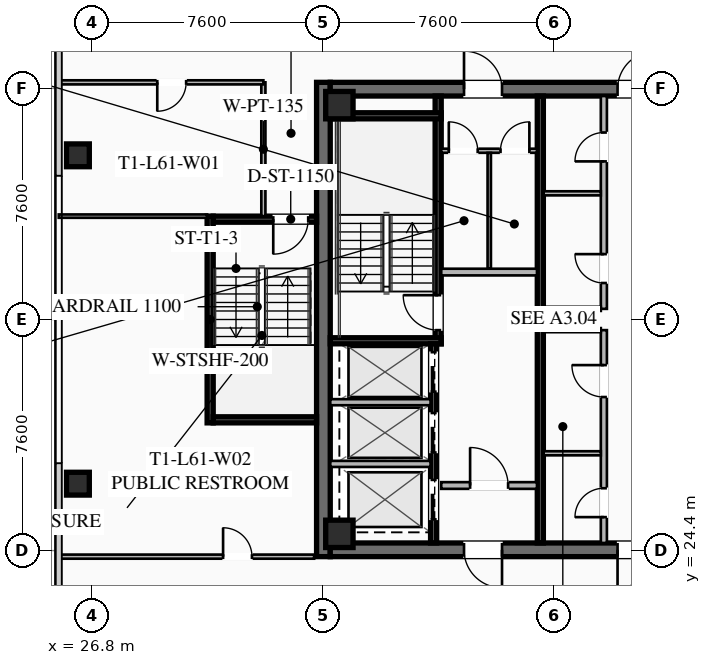
"""IFC4 building model, lengths in metres.
Left out: names, types, materials, properties, quantities, classifications, styles, units other than length and angle.
Written with IfcOpenShell. Run it as: python <this file> out.ifc"""

import sys

from ifc_helpers import new_model, si_unit, direction, frame, frame_2d, origin, origin_2d, place, context, subcontext, project, spatial, rectangle, hollow_rectangle, extrude, element, fill, save


model = new_model("IFC4")
c1 = context("Model", 3, precision=1e-05, world=origin(), true_north=direction((0.0, 1.0)))
c2 = subcontext(c1, "Body", "Model", "MODEL_VIEW")
j1 = project(units=[si_unit("LENGTHUNIT", "METRE"), si_unit("PLANEANGLEUNIT", "RADIAN")], contexts=[c1])
p1 = place(None, origin())
s1 = spatial("IfcSite", under=j1, at=p1, CompositionType="ELEMENT")
p2 = place(p1, origin())
s2 = spatial("IfcBuilding", under=s1, at=p2, CompositionType="ELEMENT")
p3 = place(p2, frame((0.0, 0.0, 225.5)))
s3 = spatial("IfcBuildingStorey", under=s2, at=p3, CompositionType="ELEMENT", Elevation=225.5)
p4 = place(p3, frame((34.425, 24.2, 0.0), z_axis=(0.0, 0.0, 1.0), x_axis=(0.0, 1.0, 0.0)))
e1 = element("IfcWall", 1, at=p4, inside=s3, PredefinedType="SHEAR", context=c2, shape_type="SweptSolid", body=[
    extrude(rectangle(XDim=15.6, YDim=0.45, at=frame_2d((7.8, 0.0))), origin(), (0.0, 0.0, 1.0), 3.55),
])
p5 = place(p3, frame((49.35, 24.425, 0.0), z_axis=(0.0, 0.0, 1.0), x_axis=(-1.0, 0.0, 0.0)))
e2 = element("IfcWall", 2, at=p5, inside=s3, PredefinedType="SHEAR", context=c2, shape_type="SweptSolid", body=[
    extrude(rectangle(XDim=14.7, YDim=0.45, at=frame_2d((7.35, 0.0))), origin(), (0.0, 0.0, 1.0), 3.55),
])
p6 = place(p5, frame((9.05, 0.0, 0.0)))
e3 = element("IfcOpeningElement", 3, at=p6, cuts=e2, PredefinedType="OPENING", context=c2, shape_type="SweptSolid", body=[
    extrude(rectangle(XDim=1.25, YDim=2.25, at=frame_2d((0.625, 1.125))), frame((0.0, 0.235, 0.0), z_axis=(0.0, -1.0, 0.0), x_axis=(1.0, 0.0, 0.0)), (0.0, 0.0, 1.0), 0.47),
])
p7 = place(p5, frame((4.0, 0.0, 0.0)))
e4 = element("IfcOpeningElement", 4, at=p7, cuts=e2, PredefinedType="OPENING", context=c2, shape_type="SweptSolid", body=[
    extrude(rectangle(XDim=1.25, YDim=2.25, at=frame_2d((0.625, 1.125))), frame((0.0, 0.235, 0.0), z_axis=(0.0, -1.0, 0.0), x_axis=(1.0, 0.0, 0.0)), (0.0, 0.0, 1.0), 0.47),
])
p8 = place(p3, frame((34.65, 39.575, 0.0), z_axis=(0.0, 0.0, 1.0), x_axis=(1.0, 0.0, 0.0)))
e5 = element("IfcWall", 5, at=p8, inside=s3, PredefinedType="SHEAR", context=c2, shape_type="SweptSolid", body=[
    extrude(rectangle(XDim=14.7, YDim=0.45, at=frame_2d((7.35, 0.0))), origin(), (0.0, 0.0, 1.0), 3.55),
])
p9 = place(p8, frame((4.4, 0.0, 0.0)))
e6 = element("IfcOpeningElement", 6, at=p9, cuts=e5, PredefinedType="OPENING", context=c2, shape_type="SweptSolid", body=[
    extrude(rectangle(XDim=1.25, YDim=2.25, at=frame_2d((0.625, 1.125))), frame((0.0, 0.235, 0.0), z_axis=(0.0, -1.0, 0.0), x_axis=(1.0, 0.0, 0.0)), (0.0, 0.0, 1.0), 0.47),
])
p10 = place(p8, frame((9.45, 0.0, 0.0)))
e7 = element("IfcOpeningElement", 7, at=p10, cuts=e5, PredefinedType="OPENING", context=c2, shape_type="SweptSolid", body=[
    extrude(rectangle(XDim=1.25, YDim=2.25, at=frame_2d((0.625, 1.125))), frame((0.0, 0.235, 0.0), z_axis=(0.0, -1.0, 0.0), x_axis=(1.0, 0.0, 0.0)), (0.0, 0.0, 1.0), 0.47),
])
for number, where, z_axis, x_axis in (
    (8, (34.95, 24.95, 0.0), (0.0, 0.0, 1.0), (1.0, 0.0, 0.0)),
    (9, (34.95, 39.05, 0.0), (0.0, 0.0, 1.0), (1.0, 0.0, 0.0)),
):
    element("IfcColumn", number, at=place(p3, frame(where, z_axis=z_axis, x_axis=x_axis)), inside=s3, PredefinedType="COLUMN", context=c2, shape_type="SweptSolid", body=[
        extrude(hollow_rectangle(XDim=0.9, YDim=0.9, WallThickness=0.04, at=origin_2d()), origin(), (0.0, 0.0, 1.0), 3.37),
    ])
for number, where, z_axis, x_axis in (
    (10, (26.35, 37.4, 0.0), (0.0, 0.0, 1.0), (1.0, 0.0, 0.0)),
    (11, (26.35, 26.6, 0.0), (0.0, 0.0, 1.0), (1.0, 0.0, 0.0)),
):
    element("IfcColumn", number, at=place(p3, frame(where, z_axis=z_axis, x_axis=x_axis)), inside=s3, PredefinedType="COLUMN", context=c2, shape_type="SweptSolid", body=[
        extrude(hollow_rectangle(XDim=0.75, YDim=0.75, WallThickness=0.032, at=origin_2d()), origin(), (0.0, 0.0, 1.0), 3.37),
    ])
p11 = place(p3, frame((38.2, 31.2, 0.0), z_axis=(0.0, 0.0, 1.0), x_axis=(0.0, 1.0, 0.0)))
e12 = element("IfcWall", 12, at=p11, inside=s3, PredefinedType="SHEAR", context=c2, shape_type="SweptSolid", body=[
    extrude(rectangle(XDim=8.15, YDim=0.2, at=frame_2d((4.075, 0.0))), origin(), (0.0, 0.0, 1.0), 3.37),
])
p12 = place(p11, frame((0.45, 0.0, 0.0)))
e13 = element("IfcOpeningElement", 13, at=p12, cuts=e12, PredefinedType="OPENING", context=c2, shape_type="SweptSolid", body=[
    extrude(rectangle(XDim=1.15, YDim=2.2, at=frame_2d((0.575, 1.1))), frame((0.0, 0.11, 0.0), z_axis=(0.0, -1.0, 0.0), x_axis=(1.0, 0.0, 0.0)), (0.0, 0.0, 1.0), 0.22),
])
for number, where, z_axis, x_axis in (
    (14, (34.65, 31.3, 0.0), (0.0, 0.0, 1.0), (1.0, 0.0, 0.0)),
    (15, (34.65, 38.7, 0.0), (0.0, 0.0, 1.0), (1.0, 0.0, 0.0)),
):
    element("IfcWall", number, at=place(p3, frame(where, z_axis=z_axis, x_axis=x_axis)), inside=s3, PredefinedType="SHEAR", context=c2, shape_type="SweptSolid", body=[
        extrude(rectangle(XDim=3.65, YDim=0.2, at=frame_2d((1.825, 0.0))), origin(), (0.0, 0.0, 1.0), 3.37),
    ])
p13 = place(p3, frame((41.56, 24.65, 0.0), z_axis=(0.0, 0.0, 1.0), x_axis=(0.0, 1.0, 0.0)))
e16 = element("IfcWall", 16, at=p13, inside=s3, PredefinedType="SHEAR", context=c2, shape_type="SweptSolid", body=[
    extrude(rectangle(XDim=14.7, YDim=0.2, at=frame_2d((7.35, 0.0))), origin(), (0.0, 0.0, 1.0), 3.37),
])
p14 = place(p3, frame((38.3, 33.56, 0.0), z_axis=(0.0, 0.0, 1.0), x_axis=(1.0, 0.0, 0.0)))
e17 = element("IfcWall", 17, at=p14, inside=s3, PredefinedType="SOLIDWALL", context=c2, shape_type="SweptSolid", body=[
    extrude(rectangle(XDim=3.15, YDim=0.22, at=frame_2d((1.575, 0.0))), origin(), (0.0, 0.0, 1.0), 2.723),
])
p15 = place(p3, frame((38.3, 26.54, 0.0), z_axis=(0.0, 0.0, 1.0), x_axis=(1.0, 0.0, 0.0)))
e18 = element("IfcWall", 18, at=p15, inside=s3, PredefinedType="SOLIDWALL", context=c2, shape_type="SweptSolid", body=[
    extrude(rectangle(XDim=3.15, YDim=0.22, at=frame_2d((1.575, 0.0))), origin(), (0.0, 0.0, 1.0), 2.723),
])
p16 = place(p15, frame((0.95, 0.0, 0.0)))
e19 = element("IfcOpeningElement", 19, at=p16, cuts=e18, PredefinedType="OPENING", context=c2, shape_type="SweptSolid", body=[
    extrude(rectangle(XDim=1.25, YDim=2.25, at=frame_2d((0.625, 1.125))), frame((0.0, 0.12, 0.0), z_axis=(0.0, -1.0, 0.0), x_axis=(1.0, 0.0, 0.0)), (0.0, 0.0, 1.0), 0.24),
])
p17 = place(p3, frame((38.05, 24.65, 0.0), z_axis=(0.0, 0.0, 1.0), x_axis=(0.0, 1.0, 0.0)))
e20 = element("IfcWall", 20, at=p17, inside=s3, PredefinedType="SHEAR", context=c2, shape_type="SweptSolid", body=[
    extrude(rectangle(XDim=6.55, YDim=0.2, at=frame_2d((3.275, 0.0))), origin(), (0.0, 0.0, 1.0), 3.37),
])
p18 = place(p17, frame((4.975, 0.0, 0.0)))
e21 = element("IfcOpeningElement", 21, at=p18, cuts=e20, PredefinedType="OPENING", context=c2, shape_type="SweptSolid", body=[
    extrude(rectangle(XDim=1.3, YDim=2.25, at=frame_2d((0.65, 1.125))), frame((0.0, 0.11, 0.0), z_axis=(0.0, -1.0, 0.0), x_axis=(1.0, 0.0, 0.0)), (0.0, 0.0, 1.0), 0.22),
])
p19 = place(p17, frame((2.975, 0.0, 0.0)))
e22 = element("IfcOpeningElement", 22, at=p19, cuts=e20, PredefinedType="OPENING", context=c2, shape_type="SweptSolid", body=[
    extrude(rectangle(XDim=1.3, YDim=2.25, at=frame_2d((0.65, 1.125))), frame((0.0, 0.11, 0.0), z_axis=(0.0, -1.0, 0.0), x_axis=(1.0, 0.0, 0.0)), (0.0, 0.0, 1.0), 0.22),
])
p20 = place(p17, frame((0.775, 0.0, 0.0)))
e23 = element("IfcOpeningElement", 23, at=p20, cuts=e20, PredefinedType="OPENING", context=c2, shape_type="SweptSolid", body=[
    extrude(rectangle(XDim=1.3, YDim=2.25, at=frame_2d((0.65, 1.125))), frame((0.0, 0.11, 0.0), z_axis=(0.0, -1.0, 0.0), x_axis=(1.0, 0.0, 0.0)), (0.0, 0.0, 1.0), 0.22),
])
for number, where, z_axis, x_axis in (
    (24, (34.65, 27.25, 0.0), (0.0, 0.0, 1.0), (1.0, 0.0, 0.0)),
    (25, (34.65, 29.28, 0.0), (0.0, 0.0, 1.0), (1.0, 0.0, 0.0)),
):
    element("IfcWall", number, at=place(p3, frame(where, z_axis=z_axis, x_axis=x_axis)), inside=s3, PredefinedType="SOLIDWALL", context=c2, shape_type="SweptSolid", body=[
        extrude(rectangle(XDim=3.3, YDim=0.2, at=frame_2d((1.65, 0.0))), origin(), (0.0, 0.0, 1.0), 3.37),
    ])
p21 = place(p3, frame((38.3, 37.55, 0.0), z_axis=(0.0, 0.0, 1.0), x_axis=(1.0, 0.0, 0.0)))
e26 = element("IfcWall", 26, at=p21, inside=s3, PredefinedType="PARTITIONING", context=c2, shape_type="SweptSolid", body=[
    extrude(rectangle(XDim=3.15, YDim=0.135, at=frame_2d((1.575, 0.0))), origin(), (0.0, 0.0, 1.0), 2.723),
])
p22 = place(p21, frame((0.25, 0.0, 0.0)))
e27 = element("IfcOpeningElement", 27, at=p22, cuts=e26, PredefinedType="OPENING", context=c2, shape_type="SweptSolid", body=[
    extrude(rectangle(XDim=0.95, YDim=2.05, at=frame_2d((0.475, 1.025))), frame((0.0, 0.077, 0.0), z_axis=(0.0, -1.0, 0.0), x_axis=(1.0, 0.0, 0.0)), (0.0, 0.0, 1.0), 0.155),
])
p23 = place(p21, frame((1.95, 0.0, 0.0)))
e28 = element("IfcOpeningElement", 28, at=p23, cuts=e26, PredefinedType="OPENING", context=c2, shape_type="SweptSolid", body=[
    extrude(rectangle(XDim=0.95, YDim=2.05, at=frame_2d((0.475, 1.025))), frame((0.0, 0.077, 0.0), z_axis=(0.0, -1.0, 0.0), x_axis=(1.0, 0.0, 0.0)), (0.0, 0.0, 1.0), 0.155),
])
p24 = place(p3, frame((39.88, 33.68, 0.0), z_axis=(0.0, 0.0, 1.0), x_axis=(0.0, 1.0, 0.0)))
e29 = element("IfcWall", 29, at=p24, inside=s3, PredefinedType="PARTITIONING", context=c2, shape_type="SweptSolid", body=[
    extrude(rectangle(XDim=3.8, YDim=0.11, at=frame_2d((1.9, 0.0))), origin(), (0.0, 0.0, 1.0), 2.723),
])
p25 = place(p3, frame((43.65, 24.65, 0.0), z_axis=(0.0, 0.0, 1.0), x_axis=(0.0, 1.0, 0.0)))
e30 = element("IfcWall", 30, at=p25, inside=s3, PredefinedType="SOLIDWALL", context=c2, shape_type="SweptSolid", body=[
    extrude(rectangle(XDim=7.0, YDim=0.2, at=frame_2d((3.5, 0.0))), origin(), (0.0, 0.0, 1.0), 2.723),
])
p26 = place(p25, frame((0.85, 0.0, 0.0)))
e31 = element("IfcOpeningElement", 31, at=p26, cuts=e30, PredefinedType="OPENING", context=c2, shape_type="SweptSolid", body=[
    extrude(rectangle(XDim=0.95, YDim=2.05, at=frame_2d((0.475, 1.025))), frame((0.0, 0.11, 0.0), z_axis=(0.0, -1.0, 0.0), x_axis=(1.0, 0.0, 0.0)), (0.0, 0.0, 1.0), 0.22),
])
p27 = place(p25, frame((4.8, 0.0, 0.0)))
e32 = element("IfcOpeningElement", 32, at=p27, cuts=e30, PredefinedType="OPENING", context=c2, shape_type="SweptSolid", body=[
    extrude(rectangle(XDim=1.05, YDim=2.2, at=frame_2d((0.525, 1.1))), frame((0.0, 0.11, 0.0), z_axis=(0.0, -1.0, 0.0), x_axis=(1.0, 0.0, 0.0)), (0.0, 0.0, 1.0), 0.22),
])
for number, where, z_axis, x_axis in (
    (33, (41.67, 31.65, 0.0), (0.0, 0.0, 1.0), (1.0, 0.0, 0.0)),
    (34, (41.67, 27.6, 0.0), (0.0, 0.0, 1.0), (1.0, 0.0, 0.0)),
):
    element("IfcWall", number, at=place(p3, frame(where, z_axis=z_axis, x_axis=x_axis)), inside=s3, PredefinedType="PARTITIONING", context=c2, shape_type="SweptSolid", body=[
        extrude(rectangle(XDim=1.88, YDim=0.135, at=frame_2d((0.94, 0.0))), origin(), (0.0, 0.0, 1.0), 2.723),
    ])
p28 = place(p3, frame((43.65, 32.35, 0.0), z_axis=(0.0, 0.0, 1.0), x_axis=(0.0, 1.0, 0.0)))
e35 = element("IfcWall", 35, at=p28, inside=s3, PredefinedType="SOLIDWALL", context=c2, shape_type="SweptSolid", body=[
    extrude(rectangle(XDim=7.0, YDim=0.2, at=frame_2d((3.5, 0.0))), origin(), (0.0, 0.0, 1.0), 2.723),
])
p29 = place(p28, frame((0.85, 0.0, 0.0)))
e36 = element("IfcOpeningElement", 36, at=p29, cuts=e35, PredefinedType="OPENING", context=c2, shape_type="SweptSolid", body=[
    extrude(rectangle(XDim=0.95, YDim=2.05, at=frame_2d((0.475, 1.025))), frame((0.0, 0.11, 0.0), z_axis=(0.0, -1.0, 0.0), x_axis=(1.0, 0.0, 0.0)), (0.0, 0.0, 1.0), 0.22),
])
p30 = place(p28, frame((4.85, 0.0, 0.0)))
e37 = element("IfcOpeningElement", 37, at=p30, cuts=e35, PredefinedType="OPENING", context=c2, shape_type="SweptSolid", body=[
    extrude(rectangle(XDim=0.95, YDim=2.05, at=frame_2d((0.475, 1.025))), frame((0.0, 0.11, 0.0), z_axis=(0.0, -1.0, 0.0), x_axis=(1.0, 0.0, 0.0)), (0.0, 0.0, 1.0), 0.22),
])
for number, where, z_axis, x_axis in (
    (38, (41.67, 32.35, 0.0), (0.0, 0.0, 1.0), (1.0, 0.0, 0.0)),
    (39, (41.67, 36.15, 0.0), (0.0, 0.0, 1.0), (1.0, 0.0, 0.0)),
):
    element("IfcWall", number, at=place(p3, frame(where, z_axis=z_axis, x_axis=x_axis)), inside=s3, PredefinedType="PARTITIONING", context=c2, shape_type="SweptSolid", body=[
        extrude(rectangle(XDim=1.88, YDim=0.135, at=frame_2d((0.94, 0.0))), origin(), (0.0, 0.0, 1.0), 2.723),
    ])
p31 = place(p3, frame((30.7, 28.6, 0.0), z_axis=(0.0, 0.0, 1.0), x_axis=(0.0, 1.0, 0.0)))
e40 = element("IfcWall", 40, at=p31, inside=s3, PredefinedType="SHEAR", context=c2, shape_type="SweptSolid", body=[
    extrude(rectangle(XDim=6.8, YDim=0.2, at=frame_2d((3.4, 0.0))), origin(), (0.0, 0.0, 1.0), 3.37),
])
p32 = place(p3, frame((34.2, 35.3, 0.0), z_axis=(0.0, 0.0, 1.0), x_axis=(-1.0, 0.0, 0.0)))
e41 = element("IfcWall", 41, at=p32, inside=s3, PredefinedType="SHEAR", context=c2, shape_type="SweptSolid", body=[
    extrude(rectangle(XDim=3.4, YDim=0.2, at=frame_2d((1.7, 0.0))), origin(), (0.0, 0.0, 1.0), 3.37),
])
p33 = place(p32, frame((0.275, 0.0, 0.0)))
e42 = element("IfcOpeningElement", 42, at=p33, cuts=e41, PredefinedType="OPENING", context=c2, shape_type="SweptSolid", body=[
    extrude(rectangle(XDim=1.15, YDim=2.2, at=frame_2d((0.575, 1.1))), frame((0.0, 0.11, 0.0), z_axis=(0.0, -1.0, 0.0), x_axis=(1.0, 0.0, 0.0)), (0.0, 0.0, 1.0), 0.22),
])
p34 = place(p3, frame((30.8, 28.7, 0.0), z_axis=(0.0, 0.0, 1.0), x_axis=(1.0, 0.0, 0.0)))
e43 = element("IfcWall", 43, at=p34, inside=s3, PredefinedType="SHEAR", context=c2, shape_type="SweptSolid", body=[
    extrude(rectangle(XDim=3.4, YDim=0.2, at=frame_2d((1.7, 0.0))), origin(), (0.0, 0.0, 1.0), 3.37),
])
p35 = place(p3, frame((32.45, 35.4, 0.0), z_axis=(0.0, 0.0, 1.0), x_axis=(0.0, 1.0, 0.0)))
e44 = element("IfcWall", 44, at=p35, inside=s3, PredefinedType="PARTITIONING", context=c2, shape_type="SweptSolid", body=[
    extrude(rectangle(XDim=4.4, YDim=0.135, at=frame_2d((2.2, 0.0))), origin(), (0.0, 0.0, 1.0), 2.723),
])
p36 = place(p3, frame((32.45, 39.8, 0.0), z_axis=(0.0, 0.0, 1.0), x_axis=(-1.0, 0.0, 0.0)))
e45 = element("IfcWall", 45, at=p36, inside=s3, PredefinedType="PARTITIONING", context=c2, shape_type="SweptSolid", body=[
    extrude(rectangle(XDim=6.73, YDim=0.135, at=frame_2d((3.365, 0.0))), origin(), (0.0, 0.0, 1.0), 2.723),
])
p37 = place(p36, frame((2.54, 0.0, 0.0)))
e46 = element("IfcOpeningElement", 46, at=p37, cuts=e45, PredefinedType="OPENING", context=c2, shape_type="SweptSolid", body=[
    extrude(rectangle(XDim=0.95, YDim=2.05, at=frame_2d((0.475, 1.025))), frame((0.0, 0.077, 0.0), z_axis=(0.0, -1.0, 0.0), x_axis=(1.0, 0.0, 0.0)), (0.0, 0.0, 1.0), 0.155),
])
p38 = place(p3, frame((25.72, 24.2, 0.0), z_axis=(0.0, 0.0, 1.0), x_axis=(1.0, 0.0, 0.0)))
e47 = element("IfcWall", 47, at=p38, inside=s3, PredefinedType="PARTITIONING", context=c2, shape_type="SweptSolid", body=[
    extrude(rectangle(XDim=8.4, YDim=0.135, at=frame_2d((4.2, 0.0))), origin(), (0.0, 0.0, 1.0), 2.723),
])
p39 = place(p38, frame((5.405, 0.0, 0.0)))
e48 = element("IfcOpeningElement", 48, at=p39, cuts=e47, PredefinedType="OPENING", context=c2, shape_type="SweptSolid", body=[
    extrude(rectangle(XDim=0.95, YDim=2.05, at=frame_2d((0.475, 1.025))), frame((0.0, 0.077, 0.0), z_axis=(0.0, -1.0, 0.0), x_axis=(1.0, 0.0, 0.0)), (0.0, 0.0, 1.0), 0.155),
])
p40 = place(p3, frame((30.6, 35.4, 0.0), z_axis=(0.0, 0.0, 1.0), x_axis=(-1.0, 0.0, 0.0)))
e49 = element("IfcWall", 49, at=p40, inside=s3, PredefinedType="PARTITIONING", context=c2, shape_type="SweptSolid", body=[
    extrude(rectangle(XDim=4.88, YDim=0.11, at=frame_2d((2.44, 0.0))), origin(), (0.0, 0.0, 1.0), 2.723),
])
p41 = place(p9, origin())
e50 = element("IfcDoor", 50, at=p41, inside=s3, OperationType="SINGLE_SWING_LEFT", PredefinedType="DOOR", context=c2, shape_type="SweptSolid", body=[
    extrude(rectangle(XDim=1.25, YDim=2.25, at=frame_2d((0.625, 1.125))), frame((0.0, 0.025, 0.0), z_axis=(0.0, -1.0, 0.0), x_axis=(1.0, 0.0, 0.0)), (0.0, 0.0, 1.0), 0.05),
])
fill(e6, e50)
p42 = place(p10, origin())
e51 = element("IfcDoor", 51, at=p42, inside=s3, OperationType="SINGLE_SWING_RIGHT", PredefinedType="DOOR", context=c2, shape_type="SweptSolid", body=[
    extrude(rectangle(XDim=1.25, YDim=2.25, at=frame_2d((0.625, 1.125))), frame((0.0, 0.025, 0.0), z_axis=(0.0, -1.0, 0.0), x_axis=(1.0, 0.0, 0.0)), (0.0, 0.0, 1.0), 0.05),
])
fill(e7, e51)
p43 = place(p6, origin())
e52 = element("IfcDoor", 52, at=p43, inside=s3, OperationType="SINGLE_SWING_LEFT", PredefinedType="DOOR", context=c2, shape_type="SweptSolid", body=[
    extrude(rectangle(XDim=1.25, YDim=2.25, at=frame_2d((0.625, 1.125))), frame((0.0, 0.025, 0.0), z_axis=(0.0, -1.0, 0.0), x_axis=(1.0, 0.0, 0.0)), (0.0, 0.0, 1.0), 0.05),
])
fill(e3, e52)
p44 = place(p7, origin())
e53 = element("IfcDoor", 53, at=p44, inside=s3, OperationType="SINGLE_SWING_RIGHT", PredefinedType="DOOR", context=c2, shape_type="SweptSolid", body=[
    extrude(rectangle(XDim=1.25, YDim=2.25, at=frame_2d((0.625, 1.125))), frame((0.0, 0.025, 0.0), z_axis=(0.0, -1.0, 0.0), x_axis=(1.0, 0.0, 0.0)), (0.0, 0.0, 1.0), 0.05),
])
fill(e4, e53)
p45 = place(p12, origin())
e54 = element("IfcDoor", 54, at=p45, inside=s3, OperationType="SINGLE_SWING_RIGHT", PredefinedType="DOOR", context=c2, shape_type="SweptSolid", body=[
    extrude(rectangle(XDim=1.15, YDim=2.2, at=frame_2d((0.575, 1.1))), frame((0.0, 0.025, 0.0), z_axis=(0.0, -1.0, 0.0), x_axis=(1.0, 0.0, 0.0)), (0.0, 0.0, 1.0), 0.05),
])
fill(e13, e54)
p46 = place(p16, origin())
e55 = element("IfcDoor", 55, at=p46, inside=s3, OperationType="SINGLE_SWING_LEFT", PredefinedType="DOOR", context=c2, shape_type="SweptSolid", body=[
    extrude(rectangle(XDim=1.25, YDim=2.25, at=frame_2d((0.625, 1.125))), frame((0.0, 0.025, 0.0), z_axis=(0.0, -1.0, 0.0), x_axis=(1.0, 0.0, 0.0)), (0.0, 0.0, 1.0), 0.05),
])
fill(e19, e55)
p47 = place(p22, origin())
e56 = element("IfcDoor", 56, at=p47, inside=s3, OperationType="SINGLE_SWING_LEFT", PredefinedType="DOOR", context=c2, shape_type="SweptSolid", body=[
    extrude(rectangle(XDim=0.95, YDim=2.05, at=frame_2d((0.475, 1.025))), frame((0.0, 0.025, 0.0), z_axis=(0.0, -1.0, 0.0), x_axis=(1.0, 0.0, 0.0)), (0.0, 0.0, 1.0), 0.05),
])
fill(e27, e56)
p48 = place(p23, origin())
e57 = element("IfcDoor", 57, at=p48, inside=s3, OperationType="SINGLE_SWING_RIGHT", PredefinedType="DOOR", context=c2, shape_type="SweptSolid", body=[
    extrude(rectangle(XDim=0.95, YDim=2.05, at=frame_2d((0.475, 1.025))), frame((0.0, 0.025, 0.0), z_axis=(0.0, -1.0, 0.0), x_axis=(1.0, 0.0, 0.0)), (0.0, 0.0, 1.0), 0.05),
])
fill(e28, e57)
p49 = place(p26, origin())
e58 = element("IfcDoor", 58, at=p49, inside=s3, OperationType="SINGLE_SWING_LEFT", PredefinedType="DOOR", context=c2, shape_type="SweptSolid", body=[
    extrude(rectangle(XDim=0.95, YDim=2.05, at=frame_2d((0.475, 1.025))), frame((0.0, 0.025, 0.0), z_axis=(0.0, -1.0, 0.0), x_axis=(1.0, 0.0, 0.0)), (0.0, 0.0, 1.0), 0.05),
])
fill(e31, e58)
p50 = place(p27, origin())
e59 = element("IfcDoor", 59, at=p50, inside=s3, OperationType="SINGLE_SWING_RIGHT", PredefinedType="DOOR", context=c2, shape_type="SweptSolid", body=[
    extrude(rectangle(XDim=1.05, YDim=2.2, at=frame_2d((0.525, 1.1))), frame((0.0, 0.025, 0.0), z_axis=(0.0, -1.0, 0.0), x_axis=(1.0, 0.0, 0.0)), (0.0, 0.0, 1.0), 0.05),
])
fill(e32, e59)
p51 = place(p29, origin())
e60 = element("IfcDoor", 60, at=p51, inside=s3, OperationType="SINGLE_SWING_RIGHT", PredefinedType="DOOR", context=c2, shape_type="SweptSolid", body=[
    extrude(rectangle(XDim=0.95, YDim=2.05, at=frame_2d((0.475, 1.025))), frame((0.0, 0.025, 0.0), z_axis=(0.0, -1.0, 0.0), x_axis=(1.0, 0.0, 0.0)), (0.0, 0.0, 1.0), 0.05),
])
fill(e36, e60)
p52 = place(p30, origin())
e61 = element("IfcDoor", 61, at=p52, inside=s3, OperationType="SINGLE_SWING_LEFT", PredefinedType="DOOR", context=c2, shape_type="SweptSolid", body=[
    extrude(rectangle(XDim=0.95, YDim=2.05, at=frame_2d((0.475, 1.025))), frame((0.0, 0.025, 0.0), z_axis=(0.0, -1.0, 0.0), x_axis=(1.0, 0.0, 0.0)), (0.0, 0.0, 1.0), 0.05),
])
fill(e37, e61)
p53 = place(p33, origin())
e62 = element("IfcDoor", 62, at=p53, inside=s3, OperationType="SINGLE_SWING_RIGHT", PredefinedType="DOOR", context=c2, shape_type="SweptSolid", body=[
    extrude(rectangle(XDim=1.15, YDim=2.2, at=frame_2d((0.575, 1.1))), frame((0.0, 0.025, 0.0), z_axis=(0.0, -1.0, 0.0), x_axis=(1.0, 0.0, 0.0)), (0.0, 0.0, 1.0), 0.05),
])
fill(e42, e62)
p54 = place(p37, origin())
e63 = element("IfcDoor", 63, at=p54, inside=s3, OperationType="SINGLE_SWING_RIGHT", PredefinedType="DOOR", context=c2, shape_type="SweptSolid", body=[
    extrude(rectangle(XDim=0.95, YDim=2.05, at=frame_2d((0.475, 1.025))), frame((0.0, 0.025, 0.0), z_axis=(0.0, -1.0, 0.0), x_axis=(1.0, 0.0, 0.0)), (0.0, 0.0, 1.0), 0.05),
])
fill(e46, e63)
p55 = place(p39, origin())
e64 = element("IfcDoor", 64, at=p55, inside=s3, OperationType="SINGLE_SWING_LEFT", PredefinedType="DOOR", context=c2, shape_type="SweptSolid", body=[
    extrude(rectangle(XDim=0.95, YDim=2.05, at=frame_2d((0.475, 1.025))), frame((0.0, 0.025, 0.0), z_axis=(0.0, -1.0, 0.0), x_axis=(1.0, 0.0, 0.0)), (0.0, 0.0, 1.0), 0.05),
])
fill(e48, e64)
p56 = place(p18, origin())
e65 = element("IfcDoor", 65, at=p56, inside=s3, OperationType="SLIDING_TO_LEFT", PredefinedType="DOOR", context=c2, shape_type="SweptSolid", body=[
    extrude(rectangle(XDim=1.3, YDim=2.25, at=frame_2d((0.65, 1.125))), frame((0.0, 0.025, 0.0), z_axis=(0.0, -1.0, 0.0), x_axis=(1.0, 0.0, 0.0)), (0.0, 0.0, 1.0), 0.05),
])
fill(e21, e65)
p57 = place(p19, origin())
e66 = element("IfcDoor", 66, at=p57, inside=s3, OperationType="SLIDING_TO_LEFT", PredefinedType="DOOR", context=c2, shape_type="SweptSolid", body=[
    extrude(rectangle(XDim=1.3, YDim=2.25, at=frame_2d((0.65, 1.125))), frame((0.0, 0.025, 0.0), z_axis=(0.0, -1.0, 0.0), x_axis=(1.0, 0.0, 0.0)), (0.0, 0.0, 1.0), 0.05),
])
fill(e22, e66)
p58 = place(p20, origin())
e67 = element("IfcDoor", 67, at=p58, inside=s3, OperationType="SLIDING_TO_LEFT", PredefinedType="DOOR", context=c2, shape_type="SweptSolid", body=[
    extrude(rectangle(XDim=1.3, YDim=2.25, at=frame_2d((0.65, 1.125))), frame((0.0, 0.025, 0.0), z_axis=(0.0, -1.0, 0.0), x_axis=(1.0, 0.0, 0.0)), (0.0, 0.0, 1.0), 0.05),
])
fill(e23, e67)
save(model, sys.argv[1])
